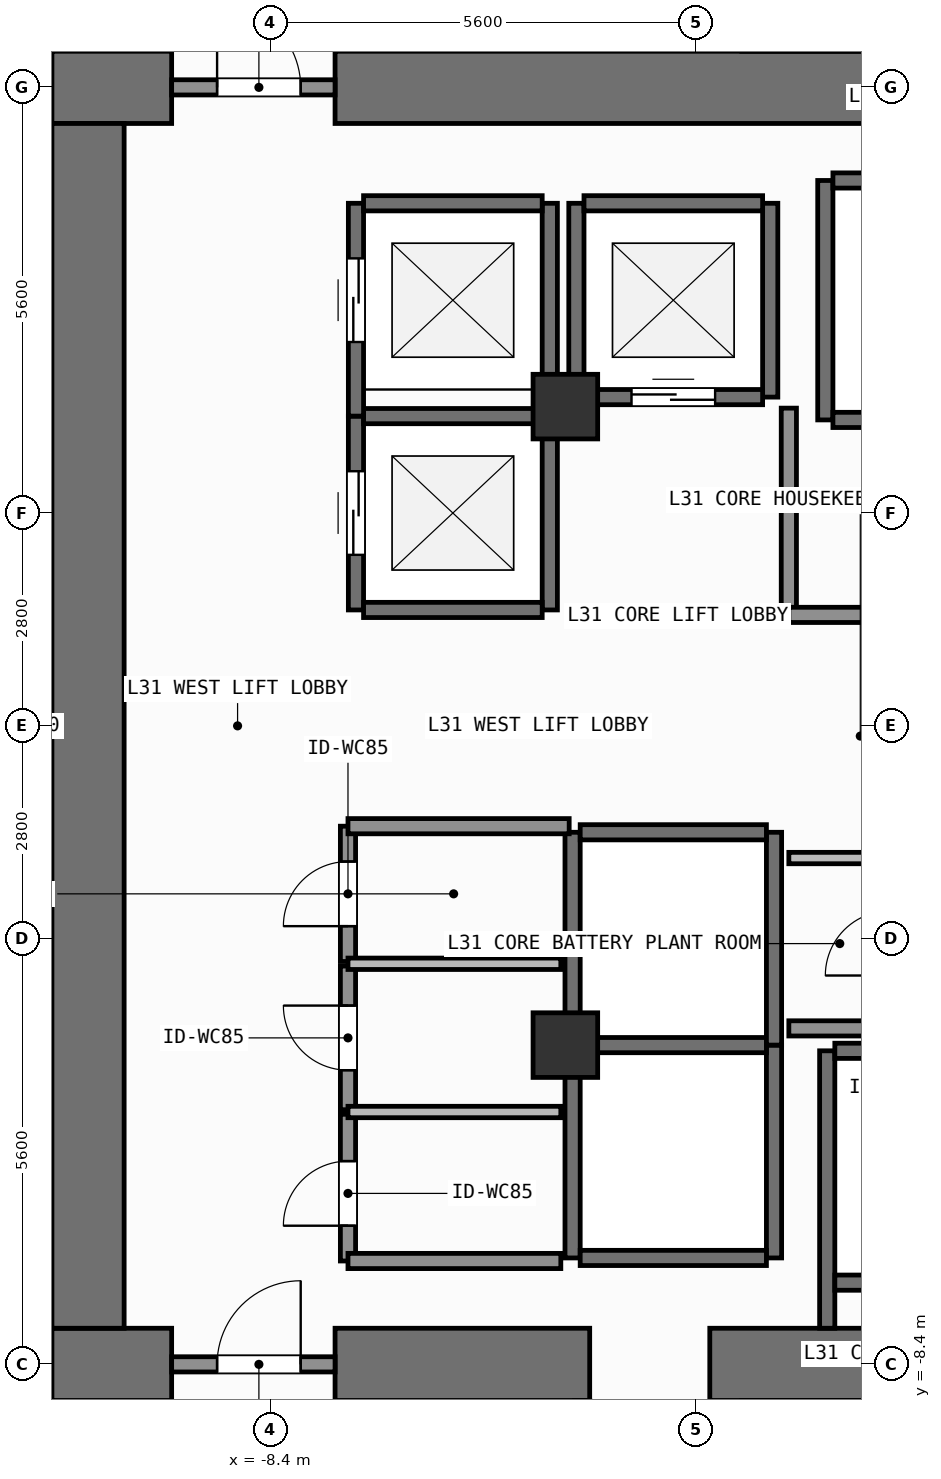
"""IFC4 building model, lengths in metres.
Left out: names, types, materials, properties, quantities, classifications, styles, units other than length and angle.
Written with IfcOpenShell. Run it as: python <this file> out.ifc"""

import sys

from ifc_helpers import new_model, si_unit, direction, frame, frame_2d, origin, origin_2d, place, context, subcontext, project, spatial, rectangle, extrude, element, fill, save


model = new_model("IFC4")
c1 = context("Model", 3, precision=1e-05, world=origin(), true_north=direction((0.0, 1.0)))
c2 = subcontext(c1, "Body", "Model", "MODEL_VIEW")
j1 = project(units=[si_unit("LENGTHUNIT", "METRE"), si_unit("PLANEANGLEUNIT", "RADIAN")], contexts=[c1])
p1 = place(None, origin())
s1 = spatial("IfcSite", under=j1, at=p1, CompositionType="ELEMENT")
p2 = place(p1, origin())
s2 = spatial("IfcBuilding", under=s1, at=p2, CompositionType="ELEMENT")
p3 = place(p2, frame((0.0, 0.0, 125.1)))
s3 = spatial("IfcBuildingStorey", under=s2, at=p3, CompositionType="ELEMENT", Elevation=125.1)
p4 = place(p3, frame((-11.275, -8.4, 0.0), z_axis=(0.0, 0.0, 1.0), x_axis=(1.0, 0.0, 0.0)))
e1 = element("IfcWall", 1, at=p4, inside=s3, PredefinedType="SHEAR", context=c2, shape_type="SweptSolid", body=[
    extrude(rectangle(XDim=1.575, YDim=0.95, at=frame_2d((0.788, 0.0))), origin(), (0.0, 0.0, 1.0), 3.9),
])
p5 = place(p3, frame((-7.55, -8.4, 0.0), z_axis=(0.0, 0.0, 1.0), x_axis=(1.0, 0.0, 0.0)))
e2 = element("IfcWall", 2, at=p5, inside=s3, PredefinedType="SHEAR", context=c2, shape_type="SweptSolid", body=[
    extrude(rectangle(XDim=3.35, YDim=0.95, at=frame_2d((1.675, 0.0))), origin(), (0.0, 0.0, 1.0), 3.9),
])
p6 = place(p3, frame((-2.62, -8.4, 0.0), z_axis=(0.0, 0.0, 1.0), x_axis=(1.0, 0.0, 0.0)))
e3 = element("IfcWall", 3, at=p6, inside=s3, PredefinedType="SHEAR", context=c2, shape_type="SweptSolid", body=[
    extrude(rectangle(XDim=7.27, YDim=0.95, at=frame_2d((3.635, 0.0))), origin(), (0.0, 0.0, 1.0), 3.9),
])
p7 = place(p3, frame((-11.275, 8.4, 0.0), z_axis=(0.0, 0.0, 1.0), x_axis=(1.0, 0.0, 0.0)))
e4 = element("IfcWall", 4, at=p7, inside=s3, PredefinedType="SHEAR", context=c2, shape_type="SweptSolid", body=[
    extrude(rectangle(XDim=1.575, YDim=0.95, at=frame_2d((0.788, 0.0))), origin(), (0.0, 0.0, 1.0), 3.9),
])
p8 = place(p3, frame((-7.55, 8.4, 0.0), z_axis=(0.0, 0.0, 1.0), x_axis=(1.0, 0.0, 0.0)))
e5 = element("IfcWall", 5, at=p8, inside=s3, PredefinedType="SHEAR", context=c2, shape_type="SweptSolid", body=[
    extrude(rectangle(XDim=16.425, YDim=0.95, at=frame_2d((8.212, 0.0))), origin(), (0.0, 0.0, 1.0), 3.9),
])
p9 = place(p3, frame((-10.8, -7.925, 0.0), z_axis=(0.0, 0.0, 1.0), x_axis=(0.0, 1.0, 0.0)))
e6 = element("IfcWall", 6, at=p9, inside=s3, PredefinedType="SHEAR", context=c2, shape_type="SweptSolid", body=[
    extrude(rectangle(XDim=15.85, YDim=0.95, at=frame_2d((7.925, 0.0))), origin(), (0.0, 0.0, 1.0), 3.9),
])
for number, where, z_axis, x_axis in (
    (7, (-4.52, -4.2, 0.0), (0.0, 0.0, 1.0), (1.0, 0.0, 0.0)),
    (8, (-4.52, 4.2, 0.0), (0.0, 0.0, 1.0), (1.0, 0.0, 0.0)),
):
    element("IfcColumn", number, at=place(p3, frame(where, z_axis=z_axis, x_axis=x_axis)), inside=s3, PredefinedType="COLUMN", context=c2, shape_type="SweptSolid", body=[
        extrude(rectangle(XDim=0.85, YDim=0.85, at=origin_2d()), origin(), (0.0, 0.0, 1.0), 3.9),
    ])
p10 = place(p3, frame((-7.275, 1.525, 0.0), z_axis=(0.0, 0.0, 1.0), x_axis=(0.0, 1.0, 0.0)))
e9 = element("IfcWall", 9, at=p10, inside=s3, PredefinedType="SHEAR", context=c2, shape_type="SweptSolid", body=[
    extrude(rectangle(XDim=2.55, YDim=0.2, at=frame_2d((1.275, 0.0))), origin(), (0.0, 0.0, 1.0), 3.68),
])
p11 = place(p10, frame((0.725, 0.0, 0.0)))
e10 = element("IfcOpeningElement", 10, at=p11, cuts=e9, PredefinedType="OPENING", context=c2, shape_type="SweptSolid", body=[
    extrude(rectangle(XDim=1.1, YDim=2.2, at=frame_2d((0.55, 1.1))), frame((0.0, 0.11, 0.0), z_axis=(0.0, -1.0, 0.0), x_axis=(1.0, 0.0, 0.0)), (0.0, 0.0, 1.0), 0.22),
])
p12 = place(p3, frame((-4.725, 1.525, 0.0), z_axis=(0.0, 0.0, 1.0), x_axis=(0.0, 1.0, 0.0)))
e11 = element("IfcWall", 11, at=p12, inside=s3, PredefinedType="SHEAR", context=c2, shape_type="SweptSolid", body=[
    extrude(rectangle(XDim=2.55, YDim=0.2, at=frame_2d((1.275, 0.0))), origin(), (0.0, 0.0, 1.0), 3.68),
])
for number, where, z_axis, x_axis in (
    (12, (-7.175, 1.525, 0.0), (0.0, 0.0, 1.0), (1.0, 0.0, 0.0)),
    (13, (-7.175, 4.075, 0.0), (0.0, 0.0, 1.0), (1.0, 0.0, 0.0)),
):
    element("IfcWall", number, at=place(p3, frame(where, z_axis=z_axis, x_axis=x_axis)), inside=s3, PredefinedType="SHEAR", context=c2, shape_type="SweptSolid", body=[
        extrude(rectangle(XDim=2.35, YDim=0.2, at=frame_2d((1.175, 0.0))), origin(), (0.0, 0.0, 1.0), 3.68),
    ])
p13 = place(p3, frame((-7.275, 4.075, 0.0), z_axis=(0.0, 0.0, 1.0), x_axis=(0.0, 1.0, 0.0)))
e14 = element("IfcWall", 14, at=p13, inside=s3, PredefinedType="SHEAR", context=c2, shape_type="SweptSolid", body=[
    extrude(rectangle(XDim=2.8, YDim=0.2, at=frame_2d((1.4, 0.0))), origin(), (0.0, 0.0, 1.0), 3.68),
])
p14 = place(p13, frame((0.975, 0.0, 0.0)))
e15 = element("IfcOpeningElement", 15, at=p14, cuts=e14, PredefinedType="OPENING", context=c2, shape_type="SweptSolid", body=[
    extrude(rectangle(XDim=1.1, YDim=2.2, at=frame_2d((0.55, 1.1))), frame((0.0, 0.11, 0.0), z_axis=(0.0, -1.0, 0.0), x_axis=(1.0, 0.0, 0.0)), (0.0, 0.0, 1.0), 0.22),
])
p15 = place(p3, frame((-4.725, 4.075, 0.0), z_axis=(0.0, 0.0, 1.0), x_axis=(0.0, 1.0, 0.0)))
e16 = element("IfcWall", 16, at=p15, inside=s3, PredefinedType="SHEAR", context=c2, shape_type="SweptSolid", body=[
    extrude(rectangle(XDim=2.8, YDim=0.2, at=frame_2d((1.4, 0.0))), origin(), (0.0, 0.0, 1.0), 3.68),
])
p16 = place(p3, frame((-7.175, 6.875, 0.0), z_axis=(0.0, 0.0, 1.0), x_axis=(1.0, 0.0, 0.0)))
e17 = element("IfcWall", 17, at=p16, inside=s3, PredefinedType="SHEAR", context=c2, shape_type="SweptSolid", body=[
    extrude(rectangle(XDim=2.35, YDim=0.2, at=frame_2d((1.175, 0.0))), origin(), (0.0, 0.0, 1.0), 3.68),
])
for number, where, z_axis, x_axis in (
    (18, (-4.375, 4.325, 0.0), (0.0, 0.0, 1.0), (0.0, 1.0, 0.0)),
    (19, (-1.825, 4.325, 0.0), (0.0, 0.0, 1.0), (0.0, 1.0, 0.0)),
):
    element("IfcWall", number, at=place(p3, frame(where, z_axis=z_axis, x_axis=x_axis)), inside=s3, PredefinedType="SHEAR", context=c2, shape_type="SweptSolid", body=[
        extrude(rectangle(XDim=2.55, YDim=0.2, at=frame_2d((1.275, 0.0))), origin(), (0.0, 0.0, 1.0), 3.68),
    ])
p17 = place(p3, frame((-4.275, 4.325, 0.0), z_axis=(0.0, 0.0, 1.0), x_axis=(1.0, 0.0, 0.0)))
e20 = element("IfcWall", 20, at=p17, inside=s3, PredefinedType="SHEAR", context=c2, shape_type="SweptSolid", body=[
    extrude(rectangle(XDim=2.35, YDim=0.2, at=frame_2d((1.175, 0.0))), origin(), (0.0, 0.0, 1.0), 3.68),
])
p18 = place(p17, frame((0.625, 0.0, 0.0)))
e21 = element("IfcOpeningElement", 21, at=p18, cuts=e20, PredefinedType="OPENING", context=c2, shape_type="SweptSolid", body=[
    extrude(rectangle(XDim=1.1, YDim=2.2, at=frame_2d((0.55, 1.1))), frame((0.0, 0.11, 0.0), z_axis=(0.0, -1.0, 0.0), x_axis=(1.0, 0.0, 0.0)), (0.0, 0.0, 1.0), 0.22),
])
p19 = place(p3, frame((-4.275, 6.875, 0.0), z_axis=(0.0, 0.0, 1.0), x_axis=(1.0, 0.0, 0.0)))
e22 = element("IfcWall", 22, at=p19, inside=s3, PredefinedType="SHEAR", context=c2, shape_type="SweptSolid", body=[
    extrude(rectangle(XDim=2.35, YDim=0.2, at=frame_2d((1.175, 0.0))), origin(), (0.0, 0.0, 1.0), 3.68),
])
for number, where, z_axis, x_axis in (
    (23, (-4.425, -7.0, 0.0), (0.0, 0.0, 1.0), (0.0, 1.0, 0.0)),
    (24, (-1.775, -7.0, 0.0), (0.0, 0.0, 1.0), (0.0, 1.0, 0.0)),
):
    element("IfcWall", number, at=place(p3, frame(where, z_axis=z_axis, x_axis=x_axis)), inside=s3, PredefinedType="SHEAR", context=c2, shape_type="SweptSolid", body=[
        extrude(rectangle(XDim=2.8, YDim=0.2, at=frame_2d((1.4, 0.0))), origin(), (0.0, 0.0, 1.0), 3.68),
    ])
for number, where, z_axis, x_axis in (
    (25, (-4.325, -7.0, 0.0), (0.0, 0.0, 1.0), (1.0, 0.0, 0.0)),
    (26, (-4.325, -4.2, 0.0), (0.0, 0.0, 1.0), (1.0, 0.0, 0.0)),
):
    element("IfcWall", number, at=place(p3, frame(where, z_axis=z_axis, x_axis=x_axis)), inside=s3, PredefinedType="SHEAR", context=c2, shape_type="SweptSolid", body=[
        extrude(rectangle(XDim=2.45, YDim=0.2, at=frame_2d((1.225, 0.0))), origin(), (0.0, 0.0, 1.0), 3.68),
    ])
for number, where, z_axis, x_axis in (
    (27, (-4.425, -4.2, 0.0), (0.0, 0.0, 1.0), (0.0, 1.0, 0.0)),
    (28, (-1.775, -4.2, 0.0), (0.0, 0.0, 1.0), (0.0, 1.0, 0.0)),
):
    element("IfcWall", number, at=place(p3, frame(where, z_axis=z_axis, x_axis=x_axis)), inside=s3, PredefinedType="SHEAR", context=c2, shape_type="SweptSolid", body=[
        extrude(rectangle(XDim=2.8, YDim=0.2, at=frame_2d((1.4, 0.0))), origin(), (0.0, 0.0, 1.0), 3.68),
    ])
p20 = place(p3, frame((-4.325, -1.4, 0.0), z_axis=(0.0, 0.0, 1.0), x_axis=(1.0, 0.0, 0.0)))
e29 = element("IfcWall", 29, at=p20, inside=s3, PredefinedType="SHEAR", context=c2, shape_type="SweptSolid", body=[
    extrude(rectangle(XDim=2.45, YDim=0.2, at=frame_2d((1.225, 0.0))), origin(), (0.0, 0.0, 1.0), 3.68),
])
p21 = place(p3, frame((-1.1, 4.025, 0.0), z_axis=(0.0, 0.0, 1.0), x_axis=(0.0, 1.0, 0.0)))
e30 = element("IfcWall", 30, at=p21, inside=s3, PredefinedType="SHEAR", context=c2, shape_type="SweptSolid", body=[
    extrude(rectangle(XDim=3.15, YDim=0.2, at=frame_2d((1.575, 0.0))), origin(), (0.0, 0.0, 1.0), 3.68),
])
for number, where, z_axis, x_axis in (
    (31, (-1.0, 4.025, 0.0), (0.0, 0.0, 1.0), (1.0, 0.0, 0.0)),
    (32, (-1.0, 7.175, 0.0), (0.0, 0.0, 1.0), (1.0, 0.0, 0.0)),
):
    element("IfcWall", number, at=place(p3, frame(where, z_axis=z_axis, x_axis=x_axis)), inside=s3, PredefinedType="SHEAR", context=c2, shape_type="SweptSolid", body=[
        extrude(rectangle(XDim=2.4, YDim=0.2, at=frame_2d((1.2, 0.0))), origin(), (0.0, 0.0, 1.0), 3.68),
    ])
p22 = place(p3, frame((-1.075, -7.925, 0.0), z_axis=(0.0, 0.0, 1.0), x_axis=(0.0, 1.0, 0.0)))
e33 = element("IfcWall", 33, at=p22, inside=s3, PredefinedType="SHEAR", context=c2, shape_type="SweptSolid", body=[
    extrude(rectangle(XDim=3.65, YDim=0.2, at=frame_2d((1.825, 0.0))), origin(), (0.0, 0.0, 1.0), 3.68),
])
for number, where, z_axis, x_axis in (
    (34, (-0.975, -7.325, 0.0), (0.0, 0.0, 1.0), (1.0, 0.0, 0.0)),
    (35, (-0.975, -4.275, 0.0), (0.0, 0.0, 1.0), (1.0, 0.0, 0.0)),
):
    element("IfcWall", number, at=place(p3, frame(where, z_axis=z_axis, x_axis=x_axis)), inside=s3, PredefinedType="SHEAR", context=c2, shape_type="SweptSolid", body=[
        extrude(rectangle(XDim=2.35, YDim=0.2, at=frame_2d((1.175, 0.0))), origin(), (0.0, 0.0, 1.0), 3.68),
    ])
p23 = place(p3, frame((-9.7, -8.4, 0.0), z_axis=(0.0, 0.0, 1.0), x_axis=(1.0, 0.0, 0.0)))
e36 = element("IfcWall", 36, at=p23, inside=s3, PredefinedType="SOLIDWALL", context=c2, shape_type="SweptSolid", body=[
    extrude(rectangle(XDim=2.15, YDim=0.2, at=frame_2d((1.075, 0.0))), origin(), (0.0, 0.0, 1.0), 2.72),
])
p24 = place(p23, frame((0.598, 0.0, 0.0)))
e37 = element("IfcOpeningElement", 37, at=p24, cuts=e36, PredefinedType="OPENING", context=c2, shape_type="SweptSolid", body=[
    extrude(rectangle(XDim=1.1, YDim=2.15, at=frame_2d((0.55, 1.075))), frame((0.0, 0.11, 0.0), z_axis=(0.0, -1.0, 0.0), x_axis=(1.0, 0.0, 0.0)), (0.0, 0.0, 1.0), 0.22),
])
p25 = place(p3, frame((-9.7, 8.4, 0.0), z_axis=(0.0, 0.0, 1.0), x_axis=(1.0, 0.0, 0.0)))
e38 = element("IfcWall", 38, at=p25, inside=s3, PredefinedType="SOLIDWALL", context=c2, shape_type="SweptSolid", body=[
    extrude(rectangle(XDim=2.15, YDim=0.2, at=frame_2d((1.075, 0.0))), origin(), (0.0, 0.0, 1.0), 2.72),
])
p26 = place(p25, frame((0.598, 0.0, 0.0)))
e39 = element("IfcOpeningElement", 39, at=p26, cuts=e38, PredefinedType="OPENING", context=c2, shape_type="SweptSolid", body=[
    extrude(rectangle(XDim=1.1, YDim=2.15, at=frame_2d((0.55, 1.075))), frame((0.0, 0.11, 0.0), z_axis=(0.0, -1.0, 0.0), x_axis=(1.0, 0.0, 0.0)), (0.0, 0.0, 1.0), 0.22),
])
p27 = place(p3, frame((-7.38, -7.04, 0.0), z_axis=(0.0, 0.0, 1.0), x_axis=(0.0, 1.0, 0.0)))
e40 = element("IfcWall", 40, at=p27, inside=s3, PredefinedType="SOLIDWALL", context=c2, shape_type="SweptSolid", body=[
    extrude(rectangle(XDim=1.93, YDim=0.2, at=frame_2d((0.965, 0.0))), origin(), (0.0, 0.0, 1.0), 3.68),
])
p28 = place(p27, frame((0.464, 0.0, 0.0)))
e41 = element("IfcOpeningElement", 41, at=p28, cuts=e40, PredefinedType="OPENING", context=c2, shape_type="SweptSolid", body=[
    extrude(rectangle(XDim=0.85, YDim=2.1, at=frame_2d((0.425, 1.05))), frame((0.0, 0.11, 0.0), z_axis=(0.0, -1.0, 0.0), x_axis=(1.0, 0.0, 0.0)), (0.0, 0.0, 1.0), 0.22),
])
p29 = place(p3, frame((-7.38, -5.05, 0.0), z_axis=(0.0, 0.0, 1.0), x_axis=(0.0, 1.0, 0.0)))
e42 = element("IfcWall", 42, at=p29, inside=s3, PredefinedType="SOLIDWALL", context=c2, shape_type="SweptSolid", body=[
    extrude(rectangle(XDim=1.89, YDim=0.2, at=frame_2d((0.945, 0.0))), origin(), (0.0, 0.0, 1.0), 3.68),
])
p30 = place(p29, frame((0.52, 0.0, 0.0)))
e43 = element("IfcOpeningElement", 43, at=p30, cuts=e42, PredefinedType="OPENING", context=c2, shape_type="SweptSolid", body=[
    extrude(rectangle(XDim=0.85, YDim=2.1, at=frame_2d((0.425, 1.05))), frame((0.0, 0.11, 0.0), z_axis=(0.0, -1.0, 0.0), x_axis=(1.0, 0.0, 0.0)), (0.0, 0.0, 1.0), 0.22),
])
p31 = place(p3, frame((-7.38, -3.1, 0.0), z_axis=(0.0, 0.0, 1.0), x_axis=(0.0, 1.0, 0.0)))
e44 = element("IfcWall", 44, at=p31, inside=s3, PredefinedType="SOLIDWALL", context=c2, shape_type="SweptSolid", body=[
    extrude(rectangle(XDim=1.78, YDim=0.2, at=frame_2d((0.89, 0.0))), origin(), (0.0, 0.0, 1.0), 3.68),
])
p32 = place(p31, frame((0.465, 0.0, 0.0)))
e45 = element("IfcOpeningElement", 45, at=p32, cuts=e44, PredefinedType="OPENING", context=c2, shape_type="SweptSolid", body=[
    extrude(rectangle(XDim=0.85, YDim=2.1, at=frame_2d((0.425, 1.05))), frame((0.0, 0.11, 0.0), z_axis=(0.0, -1.0, 0.0), x_axis=(1.0, 0.0, 0.0)), (0.0, 0.0, 1.0), 0.22),
])
p33 = place(p3, frame((-7.38, -1.32, 0.0), z_axis=(0.0, 0.0, 1.0), x_axis=(1.0, 0.0, 0.0)))
e46 = element("IfcWall", 46, at=p33, inside=s3, PredefinedType="SOLIDWALL", context=c2, shape_type="SweptSolid", body=[
    extrude(rectangle(XDim=2.91, YDim=0.2, at=frame_2d((1.455, 0.0))), origin(), (0.0, 0.0, 1.0), 3.68),
])
p34 = place(p3, frame((-1.58, 1.48, 0.0), z_axis=(0.0, 0.0, 1.0), x_axis=(0.0, 1.0, 0.0)))
e47 = element("IfcWall", 47, at=p34, inside=s3, PredefinedType="SOLIDWALL", context=c2, shape_type="SweptSolid", body=[
    extrude(rectangle(XDim=2.7, YDim=0.2, at=frame_2d((1.35, 0.0))), origin(), (0.0, 0.0, 1.0), 3.68),
])
for number, where, z_axis, x_axis in (
    (48, (-1.58, -3.98, 0.0), (0.0, 0.0, 1.0), (1.0, 0.0, 0.0)),
    (49, (-1.58, 1.46, 0.0), (0.0, 0.0, 1.0), (1.0, 0.0, 0.0)),
):
    element("IfcWall", number, at=place(p3, frame(where, z_axis=z_axis, x_axis=x_axis)), inside=s3, PredefinedType="SOLIDWALL", context=c2, shape_type="SweptSolid", body=[
        extrude(rectangle(XDim=3.19, YDim=0.2, at=frame_2d((1.595, 0.0))), origin(), (0.0, 0.0, 1.0), 3.68),
    ])
p35 = place(p3, frame((-1.58, -1.739, 0.0), z_axis=(0.0, 0.0, 1.0), x_axis=(1.0, 0.0, 0.0)))
e50 = element("IfcWall", 50, at=p35, inside=s3, PredefinedType="PARTITIONING", context=c2, shape_type="SweptSolid", body=[
    extrude(rectangle(XDim=3.19, YDim=0.15, at=frame_2d((1.595, 0.0))), origin(), (0.0, 0.0, 1.0), 3.68),
])
p36 = place(p3, frame((-7.38, -7.04, 0.0), z_axis=(0.0, 0.0, 1.0), x_axis=(1.0, 0.0, 0.0)))
e51 = element("IfcWall", 51, at=p36, inside=s3, PredefinedType="SOLIDWALL", context=c2, shape_type="SweptSolid", body=[
    extrude(rectangle(XDim=2.8, YDim=0.2, at=frame_2d((1.4, 0.0))), origin(), (0.0, 0.0, 1.0), 3.68),
])
for number, where, z_axis, x_axis in (
    (52, (-7.38, -5.08, 0.0), (0.0, 0.0, 1.0), (1.0, 0.0, 0.0)),
    (53, (-7.38, -3.13, 0.0), (0.0, 0.0, 1.0), (1.0, 0.0, 0.0)),
):
    element("IfcWall", number, at=place(p3, frame(where, z_axis=z_axis, x_axis=x_axis)), inside=s3, PredefinedType="PARTITIONING", context=c2, shape_type="SweptSolid", body=[
        extrude(rectangle(XDim=2.8, YDim=0.15, at=frame_2d((1.4, 0.0))), origin(), (0.0, 0.0, 1.0), 3.68),
    ])
p37 = place(p11, origin())
e54 = element("IfcDoor", 54, at=p37, inside=s3, OperationType="SLIDING_TO_LEFT", PredefinedType="DOOR", context=c2, shape_type="SweptSolid", body=[
    extrude(rectangle(XDim=1.1, YDim=2.2, at=frame_2d((0.55, 1.1))), frame((0.0, 0.025, 0.0), z_axis=(0.0, -1.0, 0.0), x_axis=(1.0, 0.0, 0.0)), (0.0, 0.0, 1.0), 0.05),
])
fill(e10, e54)
p38 = place(p14, origin())
e55 = element("IfcDoor", 55, at=p38, inside=s3, OperationType="SLIDING_TO_LEFT", PredefinedType="DOOR", context=c2, shape_type="SweptSolid", body=[
    extrude(rectangle(XDim=1.1, YDim=2.2, at=frame_2d((0.55, 1.1))), frame((0.0, 0.025, 0.0), z_axis=(0.0, -1.0, 0.0), x_axis=(1.0, 0.0, 0.0)), (0.0, 0.0, 1.0), 0.05),
])
fill(e15, e55)
p39 = place(p18, origin())
e56 = element("IfcDoor", 56, at=p39, inside=s3, OperationType="SLIDING_TO_LEFT", PredefinedType="DOOR", context=c2, shape_type="SweptSolid", body=[
    extrude(rectangle(XDim=1.1, YDim=2.2, at=frame_2d((0.55, 1.1))), frame((0.0, 0.025, 0.0), z_axis=(0.0, -1.0, 0.0), x_axis=(1.0, 0.0, 0.0)), (0.0, 0.0, 1.0), 0.05),
])
fill(e21, e56)
p40 = place(p24, origin())
e57 = element("IfcDoor", 57, at=p40, inside=s3, OperationType="SINGLE_SWING_RIGHT", PredefinedType="DOOR", context=c2, shape_type="SweptSolid", body=[
    extrude(rectangle(XDim=1.1, YDim=2.15, at=frame_2d((0.55, 1.075))), frame((0.0, 0.025, 0.0), z_axis=(0.0, -1.0, 0.0), x_axis=(1.0, 0.0, 0.0)), (0.0, 0.0, 1.0), 0.05),
])
fill(e37, e57)
p41 = place(p26, origin())
e58 = element("IfcDoor", 58, at=p41, inside=s3, OperationType="SINGLE_SWING_LEFT", PredefinedType="DOOR", context=c2, shape_type="SweptSolid", body=[
    extrude(rectangle(XDim=1.1, YDim=2.15, at=frame_2d((0.55, 1.075))), frame((0.0, 0.025, 0.0), z_axis=(0.0, -1.0, 0.0), x_axis=(1.0, 0.0, 0.0)), (0.0, 0.0, 1.0), 0.05),
])
fill(e39, e58)
p42 = place(p28, origin())
e59 = element("IfcDoor", 59, at=p42, inside=s3, OperationType="SINGLE_SWING_LEFT", PredefinedType="DOOR", context=c2, shape_type="SweptSolid", body=[
    extrude(rectangle(XDim=0.85, YDim=2.1, at=frame_2d((0.425, 1.05))), frame((0.0, 0.025, 0.0), z_axis=(0.0, -1.0, 0.0), x_axis=(1.0, 0.0, 0.0)), (0.0, 0.0, 1.0), 0.05),
])
fill(e41, e59)
p43 = place(p30, origin())
e60 = element("IfcDoor", 60, at=p43, inside=s3, OperationType="SINGLE_SWING_RIGHT", PredefinedType="DOOR", context=c2, shape_type="SweptSolid", body=[
    extrude(rectangle(XDim=0.85, YDim=2.1, at=frame_2d((0.425, 1.05))), frame((0.0, 0.025, 0.0), z_axis=(0.0, -1.0, 0.0), x_axis=(1.0, 0.0, 0.0)), (0.0, 0.0, 1.0), 0.05),
])
fill(e43, e60)
p44 = place(p32, origin())
e61 = element("IfcDoor", 61, at=p44, inside=s3, OperationType="SINGLE_SWING_LEFT", PredefinedType="DOOR", context=c2, shape_type="SweptSolid", body=[
    extrude(rectangle(XDim=0.85, YDim=2.1, at=frame_2d((0.425, 1.05))), frame((0.0, 0.025, 0.0), z_axis=(0.0, -1.0, 0.0), x_axis=(1.0, 0.0, 0.0)), (0.0, 0.0, 1.0), 0.05),
])
fill(e45, e61)
save(model, sys.argv[1])
